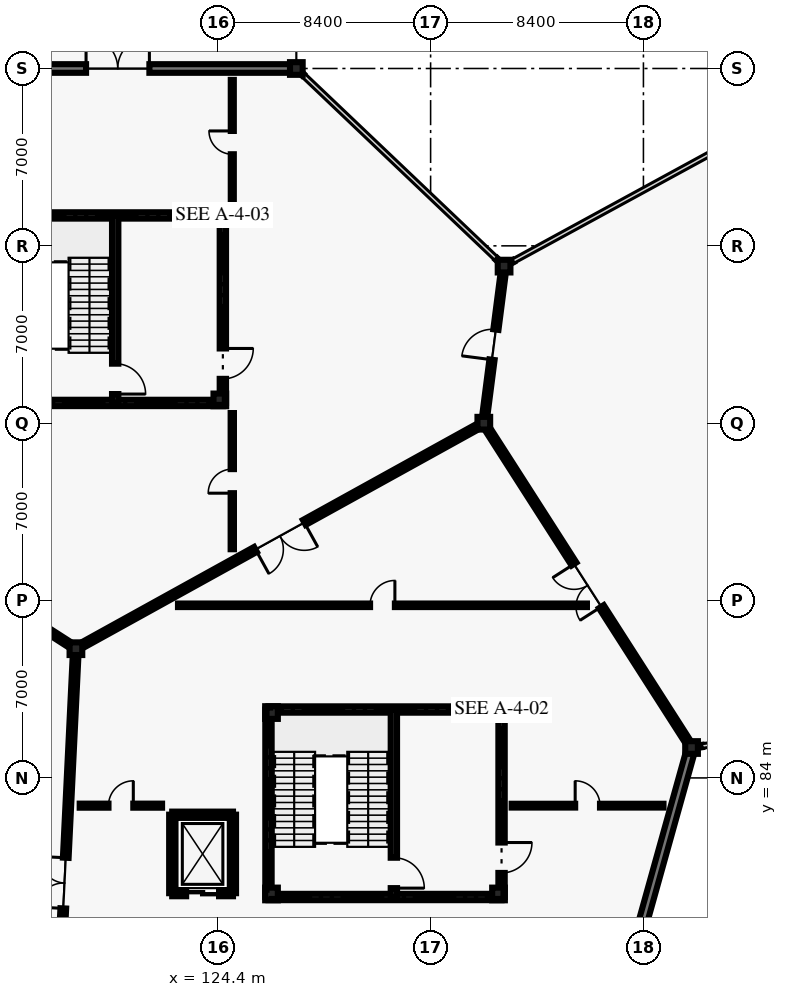
"""IFC4 building model, lengths in metres.
Left out: names, types, materials, properties, quantities, classifications, styles, units other than length and angle.
Written with IfcOpenShell. Run it as: python <this file> out.ifc"""

import sys

from ifc_helpers import new_model, si_unit, direction, frame, frame_2d, origin, origin_2d, place, context, subcontext, project, spatial, rectangle, i_section, extrude, element, fill, save


model = new_model("IFC4")
c1 = context("Model", 3, precision=1e-05, world=origin(), true_north=direction((0.0, 1.0)))
c2 = subcontext(c1, "Body", "Model", "MODEL_VIEW")
j1 = project(units=[si_unit("LENGTHUNIT", "METRE"), si_unit("PLANEANGLEUNIT", "RADIAN")], contexts=[c1])
p1 = place(None, origin())
s1 = spatial("IfcSite", under=j1, at=p1, CompositionType="ELEMENT")
p2 = place(p1, origin())
s2 = spatial("IfcBuilding", under=s1, at=p2, CompositionType="ELEMENT")
p3 = place(p2, origin())
s3 = spatial("IfcBuildingStorey", under=s2, at=p3, CompositionType="ELEMENT", Elevation=0.0)
for number, where, z_axis, x_axis in (
    (1, (118.8, 89.1, 0.0), (0.0, 0.0, 1.0), (1.0, 0.0, 0.0)),
    (2, (127.5, 112.0, 0.0), (0.0, 0.0, 1.0), (1.0, 0.0, 0.0)),
    (3, (134.9, 98.0, 0.0), (0.0, 0.0, 1.0), (1.0, 0.0, 0.0)),
    (4, (135.7, 104.2, 0.0), (0.0, 0.0, 1.0), (1.0, 0.0, 0.0)),
    (5, (143.1, 85.2, 0.0), (0.0, 0.0, 1.0), (1.0, 0.0, 0.0)),
    (6, (126.52, 79.42, 0.0), (0.0, 0.0, 1.0), (1.0, 0.0, 0.0)),
    (7, (135.48, 79.42, 0.0), (0.0, 0.0, 1.0), (1.0, 0.0, 0.0)),
    (8, (135.48, 86.58, 0.0), (0.0, 0.0, 1.0), (1.0, 0.0, 0.0)),
    (9, (126.52, 86.58, 0.0), (0.0, 0.0, 1.0), (1.0, 0.0, 0.0)),
    (10, (124.48, 98.92, 0.0), (0.0, 0.0, 1.0), (1.0, 0.0, 0.0)),
    (11, (124.48, 106.08, 0.0), (0.0, 0.0, 1.0), (1.0, 0.0, 0.0)),
):
    element("IfcColumn", number, at=place(p3, frame(where, z_axis=z_axis, x_axis=x_axis)), inside=s3, PredefinedType="COLUMN", context=c2, shape_type="SweptSolid", body=[
        extrude(i_section(OverallWidth=0.5, OverallDepth=0.5, WebThickness=0.022, FlangeThickness=0.036, at=origin_2d()), origin(), (0.0, 0.0, 1.0), 5.4),
    ])
p4 = place(p3, frame((143.084, 85.142, 0.0), z_axis=(0.0, 0.0, 1.0), x_axis=(-0.268810029922, -0.963193214165, 0.0)))
e12 = element("IfcWall", 12, at=p4, inside=s3, PredefinedType="SOLIDWALL", context=c2, shape_type="SweptSolid", body=[
    extrude(rectangle(XDim=13.333, YDim=0.34, at=frame_2d((6.667, 0.0))), origin(), (0.0, 0.0, 1.0), 4.22),
])
for number, where, z_axis, x_axis in (
    (13, (127.53, 111.971, 0.0), (0.0, 0.0, 1.0), (0.726, -0.687, 0.0)),
    (14, (135.403, 104.482, 0.0), (0.0, 0.0, 1.0), (0.726, -0.687, 0.0)),
):
    element("IfcWall", number, at=place(p3, frame(where, z_axis=z_axis, x_axis=x_axis)), inside=s3, PredefinedType="SOLIDWALL", context=c2, shape_type="SweptSolid", body=[
        extrude(rectangle(XDim=0.308, YDim=0.095, at=frame_2d((0.154, 0.0))), origin(), (0.0, 0.0, 1.0), 4.22),
    ])
p5 = place(p3, frame((113.4, 112.0, 0.0), z_axis=(0.0, 0.0, 1.0), x_axis=(1.0, 0.0, 0.0)))
e15 = element("IfcWall", 15, at=p5, inside=s3, PredefinedType="SOLIDWALL", context=c2, shape_type="SweptSolid", body=[
    extrude(rectangle(XDim=14.1, YDim=0.34, at=frame_2d((7.05, 0.0))), origin(), (0.0, 0.0, 1.0), 4.22),
])
p6 = place(p5, frame((5.8, 0.0, 0.0)))
e16 = element("IfcOpeningElement", 16, at=p6, cuts=e15, PredefinedType="OPENING", context=c2, shape_type="SweptSolid", body=[
    extrude(rectangle(XDim=2.5, YDim=2.45, at=frame_2d((1.25, 1.225))), frame((0.0, 0.18, 0.0), z_axis=(0.0, -1.0, 0.0), x_axis=(1.0, 0.0, 0.0)), (0.0, 0.0, 1.0), 0.36),
])
p7 = place(p3, frame((143.506, 85.257, 0.0), z_axis=(0.0, 0.0, 1.0), x_axis=(-0.990232667812, -0.139424759628, 0.0)))
e17 = element("IfcWall", 17, at=p7, inside=s3, PredefinedType="SOLIDWALL", context=c2, shape_type="SweptSolid", body=[
    extrude(rectangle(XDim=0.308, YDim=0.095, at=frame_2d((0.154, 0.0))), origin(), (0.0, 0.0, 1.0), 4.22),
])
p8 = place(p3, frame((135.79, 104.249, 0.0), z_axis=(0.0, 0.0, 1.0), x_axis=(0.876984894636, 0.480517944077, 0.0)))
e18 = element("IfcWall", 18, at=p8, inside=s3, PredefinedType="SOLIDWALL", context=c2, shape_type="SweptSolid", body=[
    extrude(rectangle(XDim=0.308, YDim=0.095, at=frame_2d((0.154, 0.0))), origin(), (0.0, 0.0, 1.0), 4.22),
])
p9 = place(p3, frame((117.9, 70.6, 0.0), z_axis=(0.0, 0.0, 1.0), x_axis=(0.048599072515, 0.998818366947, 0.0)))
e19 = element("IfcWall", 19, at=p9, inside=s3, PredefinedType="SOLIDWALL", context=c2, shape_type="SweptSolid", body=[
    extrude(rectangle(XDim=18.522, YDim=0.225, at=frame_2d((9.261, 0.0))), origin(), (0.0, 0.0, 1.0), 4.62),
])
p10 = place(p9, frame((8.261, 0.0, 0.0)))
e20 = element("IfcOpeningElement", 20, at=p10, cuts=e19, PredefinedType="OPENING", context=c2, shape_type="SweptSolid", body=[
    extrude(rectangle(XDim=2.0, YDim=2.5, at=frame_2d((1.0, 1.25))), frame((0.0, 0.123, 0.0), z_axis=(0.0, -1.0, 0.0), x_axis=(1.0, 0.0, 0.0)), (0.0, 0.0, 1.0), 0.245),
])
p11 = place(p3, frame((118.8, 89.1, 0.0), z_axis=(0.0, 0.0, 1.0), x_axis=(-0.841183241423, 0.540750177392, 0.0)))
e21 = element("IfcWall", 21, at=p11, inside=s3, PredefinedType="SOLIDWALL", context=c2, shape_type="SweptSolid", body=[
    extrude(rectangle(XDim=18.308, YDim=0.225, at=frame_2d((9.154, 0.0))), origin(), (0.0, 0.0, 1.0), 4.62),
])
p12 = place(p11, frame((8.229, 0.0, 0.0)))
e22 = element("IfcOpeningElement", 22, at=p12, cuts=e21, PredefinedType="OPENING", context=c2, shape_type="SweptSolid", body=[
    extrude(rectangle(XDim=1.85, YDim=2.4, at=frame_2d((0.925, 1.2))), frame((0.0, 0.123, 0.0), z_axis=(0.0, -1.0, 0.0), x_axis=(1.0, 0.0, 0.0)), (0.0, 0.0, 1.0), 0.245),
])
p13 = place(p3, frame((134.9, 98.0, 0.0), z_axis=(0.0, 0.0, 1.0), x_axis=(-0.875181353329, -0.483794996652, 0.0)))
e23 = element("IfcWall", 23, at=p13, inside=s3, PredefinedType="SOLIDWALL", context=c2, shape_type="SweptSolid", body=[
    extrude(rectangle(XDim=18.396, YDim=0.225, at=frame_2d((9.198, 0.0))), origin(), (0.0, 0.0, 1.0), 4.62),
])
p14 = place(p13, frame((8.098, 0.0, 0.0)))
e24 = element("IfcOpeningElement", 24, at=p14, cuts=e23, PredefinedType="OPENING", context=c2, shape_type="SweptSolid", body=[
    extrude(rectangle(XDim=2.2, YDim=2.6, at=frame_2d((1.1, 1.3))), frame((0.0, 0.123, 0.0), z_axis=(0.0, -1.0, 0.0), x_axis=(1.0, 0.0, 0.0)), (0.0, 0.0, 1.0), 0.245),
])
p15 = place(p3, frame((143.1, 85.2, 0.0), z_axis=(0.0, 0.0, 1.0), x_axis=(-0.539434641352, 0.842027474439, 0.0)))
e25 = element("IfcWall", 25, at=p15, inside=s3, PredefinedType="SOLIDWALL", context=c2, shape_type="SweptSolid", body=[
    extrude(rectangle(XDim=15.201, YDim=0.225, at=frame_2d((7.601, 0.0))), origin(), (0.0, 0.0, 1.0), 4.62),
])
p16 = place(p15, frame((6.601, 0.0, 0.0)))
e26 = element("IfcOpeningElement", 26, at=p16, cuts=e25, PredefinedType="OPENING", context=c2, shape_type="SweptSolid", body=[
    extrude(rectangle(XDim=2.0, YDim=2.5, at=frame_2d((1.0, 1.25))), frame((0.0, 0.123, 0.0), z_axis=(0.0, -1.0, 0.0), x_axis=(1.0, 0.0, 0.0)), (0.0, 0.0, 1.0), 0.245),
])
p17 = place(p3, frame((134.9, 98.0, 0.0), z_axis=(0.0, 0.0, 1.0), x_axis=(0.127980011854, 0.991776747341, 0.0)))
e27 = element("IfcWall", 27, at=p17, inside=s3, PredefinedType="SOLIDWALL", context=c2, shape_type="SweptSolid", body=[
    extrude(rectangle(XDim=6.251, YDim=0.205, at=frame_2d((3.126, 0.0))), origin(), (0.0, 0.0, 1.0), 3.92),
])
p18 = place(p17, frame((2.526, 0.0, 0.0)))
e28 = element("IfcOpeningElement", 28, at=p18, cuts=e27, PredefinedType="OPENING", context=c2, shape_type="SweptSolid", body=[
    extrude(rectangle(XDim=1.2, YDim=2.2, at=frame_2d((0.6, 1.1))), frame((0.0, 0.113, 0.0), z_axis=(0.0, -1.0, 0.0), x_axis=(1.0, 0.0, 0.0)), (0.0, 0.0, 1.0), 0.225),
])
p19 = place(p3, frame((118.949, 82.905, 0.0), z_axis=(0.0, 0.0, 1.0), x_axis=(1.0, 0.0, 0.0)))
e29 = element("IfcWall", 29, at=p19, inside=s3, PredefinedType="PARTITIONING", context=c2, shape_type="SweptSolid", body=[
    extrude(rectangle(XDim=3.251, YDim=0.16, at=frame_2d((1.625, 0.0))), origin(), (0.0, 0.0, 1.0), 3.92),
])
p20 = place(p19, frame((1.136, 0.0, 0.0)))
e30 = element("IfcOpeningElement", 30, at=p20, cuts=e29, PredefinedType="OPENING", context=c2, shape_type="SweptSolid", body=[
    extrude(rectangle(XDim=0.98, YDim=2.15, at=frame_2d((0.49, 1.075))), frame((0.0, 0.09, 0.0), z_axis=(0.0, -1.0, 0.0), x_axis=(1.0, 0.0, 0.0)), (0.0, 0.0, 1.0), 0.18),
])
p21 = place(p3, frame((136.0, 82.905, 0.0), z_axis=(0.0, 0.0, 1.0), x_axis=(1.0, 0.0, 0.0)))
e31 = element("IfcWall", 31, at=p21, inside=s3, PredefinedType="PARTITIONING", context=c2, shape_type="SweptSolid", body=[
    extrude(rectangle(XDim=5.992, YDim=0.15, at=frame_2d((2.996, 0.0))), origin(), (0.0, 0.0, 1.0), 3.92),
])
p22 = place(p21, frame((2.506, 0.0, 0.0)))
e32 = element("IfcOpeningElement", 32, at=p22, cuts=e31, PredefinedType="OPENING", context=c2, shape_type="SweptSolid", body=[
    extrude(rectangle(XDim=0.98, YDim=2.15, at=frame_2d((0.49, 1.075))), frame((0.0, 0.085, 0.0), z_axis=(0.0, -1.0, 0.0), x_axis=(1.0, 0.0, 0.0)), (0.0, 0.0, 1.0), 0.17),
])
p23 = place(p3, frame((122.829, 90.813, 0.0), z_axis=(0.0, 0.0, 1.0), x_axis=(1.0, 0.0, 0.0)))
e33 = element("IfcWall", 33, at=p23, inside=s3, PredefinedType="PARTITIONING", context=c2, shape_type="SweptSolid", body=[
    extrude(rectangle(XDim=16.141, YDim=0.14, at=frame_2d((8.07, 0.0))), origin(), (0.0, 0.0, 1.0), 3.92),
])
p24 = place(p23, frame((7.581, 0.0, 0.0)))
e34 = element("IfcOpeningElement", 34, at=p24, cuts=e33, PredefinedType="OPENING", context=c2, shape_type="SweptSolid", body=[
    extrude(rectangle(XDim=0.98, YDim=2.15, at=frame_2d((0.49, 1.075))), frame((0.0, 0.08, 0.0), z_axis=(0.0, -1.0, 0.0), x_axis=(1.0, 0.0, 0.0)), (0.0, 0.0, 1.0), 0.16),
])
p25 = place(p3, frame((124.972, 93.026, 0.0), z_axis=(0.0, 0.0, 1.0), x_axis=(0.0, 1.0, 0.0)))
e35 = element("IfcWall", 35, at=p25, inside=s3, PredefinedType="PARTITIONING", context=c2, shape_type="SweptSolid", body=[
    extrude(rectangle(XDim=5.374, YDim=0.13, at=frame_2d((2.687, 0.0))), origin(), (0.0, 0.0, 1.0), 3.92),
])
p26 = place(p25, frame((2.212, 0.0, 0.0)))
e36 = element("IfcOpeningElement", 36, at=p26, cuts=e35, PredefinedType="OPENING", context=c2, shape_type="SweptSolid", body=[
    extrude(rectangle(XDim=0.95, YDim=2.15, at=frame_2d((0.475, 1.075))), frame((0.0, 0.075, 0.0), z_axis=(0.0, -1.0, 0.0), x_axis=(1.0, 0.0, 0.0)), (0.0, 0.0, 1.0), 0.15),
])
p27 = place(p3, frame((124.972, 106.6, 0.0), z_axis=(0.0, 0.0, 1.0), x_axis=(0.0, 1.0, 0.0)))
e37 = element("IfcWall", 37, at=p27, inside=s3, PredefinedType="PARTITIONING", context=c2, shape_type="SweptSolid", body=[
    extrude(rectangle(XDim=4.95, YDim=0.12, at=frame_2d((2.475, 0.0))), origin(), (0.0, 0.0, 1.0), 3.92),
])
p28 = place(p27, frame((2.015, 0.0, 0.0)))
e38 = element("IfcOpeningElement", 38, at=p28, cuts=e37, PredefinedType="OPENING", context=c2, shape_type="SweptSolid", body=[
    extrude(rectangle(XDim=0.92, YDim=2.1, at=frame_2d((0.46, 1.05))), frame((0.0, 0.07, 0.0), z_axis=(0.0, -1.0, 0.0), x_axis=(1.0, 0.0, 0.0)), (0.0, 0.0, 1.0), 0.14),
])
p29 = place(p3, frame((126.4, 79.3, 0.0), z_axis=(0.0, 0.0, 1.0), x_axis=(0.0, 1.0, 0.0)))
e39 = element("IfcWall", 39, at=p29, inside=s3, PredefinedType="SHEAR", context=c2, shape_type="SweptSolid", body=[
    extrude(rectangle(XDim=7.4, YDim=0.25, at=frame_2d((3.7, 0.0))), origin(), (0.0, 0.0, 1.0), 5.16),
])
for number, where, z_axis, x_axis in (
    (40, (126.4, 86.7, 0.0), (0.0, 0.0, 1.0), (1.0, 0.0, 0.0)),
    (41, (135.6, 79.3, 0.0), (0.0, 0.0, 1.0), (-1.0, 0.0, 0.0)),
):
    element("IfcWall", number, at=place(p3, frame(where, z_axis=z_axis, x_axis=x_axis)), inside=s3, PredefinedType="SHEAR", context=c2, shape_type="SweptSolid", body=[
        extrude(rectangle(XDim=9.2, YDim=0.25, at=frame_2d((4.6, 0.0))), origin(), (0.0, 0.0, 1.0), 5.16),
    ])
p30 = place(p3, frame((135.6, 86.7, 0.0), z_axis=(0.0, 0.0, 1.0), x_axis=(0.0, -1.0, 0.0)))
e42 = element("IfcWall", 42, at=p30, inside=s3, PredefinedType="SHEAR", context=c2, shape_type="SweptSolid", body=[
    extrude(rectangle(XDim=7.4, YDim=0.25, at=frame_2d((3.7, 0.0))), origin(), (0.0, 0.0, 1.0), 5.16),
])
p31 = place(p30, frame((5.25, 0.0, 0.0)))
e43 = element("IfcOpeningElement", 43, at=p31, cuts=e42, PredefinedType="OPENING", context=c2, shape_type="SweptSolid", body=[
    extrude(rectangle(XDim=1.2, YDim=2.2, at=frame_2d((0.6, 1.1))), frame((0.0, 0.135, 0.0), z_axis=(0.0, -1.0, 0.0), x_axis=(1.0, 0.0, 0.0)), (0.0, 0.0, 1.0), 0.27),
])
p32 = place(p3, frame((131.35, 86.7, 0.0), z_axis=(0.0, 0.0, 1.0), x_axis=(0.0, -1.0, 0.0)))
e44 = element("IfcWall", 44, at=p32, inside=s3, PredefinedType="SHEAR", context=c2, shape_type="SweptSolid", body=[
    extrude(rectangle(XDim=7.4, YDim=0.25, at=frame_2d((3.7, 0.0))), origin(), (0.0, 0.0, 1.0), 5.16),
])
p33 = place(p32, frame((5.85, 0.0, 0.0)))
e45 = element("IfcOpeningElement", 45, at=p33, cuts=e44, PredefinedType="OPENING", context=c2, shape_type="SweptSolid", body=[
    extrude(rectangle(XDim=1.2, YDim=2.2, at=frame_2d((0.6, 1.1))), frame((0.0, 0.135, 0.0), z_axis=(0.0, -1.0, 0.0), x_axis=(1.0, 0.0, 0.0)), (0.0, 0.0, 1.0), 0.27),
])
for number, where, z_axis, x_axis in (
    (46, (115.4, 106.2, 0.0), (0.0, 0.0, 1.0), (1.0, 0.0, 0.0)),
    (47, (124.6, 98.8, 0.0), (0.0, 0.0, 1.0), (-1.0, 0.0, 0.0)),
):
    element("IfcWall", number, at=place(p3, frame(where, z_axis=z_axis, x_axis=x_axis)), inside=s3, PredefinedType="SHEAR", context=c2, shape_type="SweptSolid", body=[
        extrude(rectangle(XDim=9.2, YDim=0.25, at=frame_2d((4.6, 0.0))), origin(), (0.0, 0.0, 1.0), 5.16),
    ])
p34 = place(p3, frame((124.6, 106.2, 0.0), z_axis=(0.0, 0.0, 1.0), x_axis=(0.0, -1.0, 0.0)))
e48 = element("IfcWall", 48, at=p34, inside=s3, PredefinedType="SHEAR", context=c2, shape_type="SweptSolid", body=[
    extrude(rectangle(XDim=7.4, YDim=0.25, at=frame_2d((3.7, 0.0))), origin(), (0.0, 0.0, 1.0), 5.16),
])
p35 = place(p34, frame((5.25, 0.0, 0.0)))
e49 = element("IfcOpeningElement", 49, at=p35, cuts=e48, PredefinedType="OPENING", context=c2, shape_type="SweptSolid", body=[
    extrude(rectangle(XDim=1.2, YDim=2.2, at=frame_2d((0.6, 1.1))), frame((0.0, 0.135, 0.0), z_axis=(0.0, -1.0, 0.0), x_axis=(1.0, 0.0, 0.0)), (0.0, 0.0, 1.0), 0.27),
])
p36 = place(p3, frame((120.35, 106.2, 0.0), z_axis=(0.0, 0.0, 1.0), x_axis=(0.0, -1.0, 0.0)))
e50 = element("IfcWall", 50, at=p36, inside=s3, PredefinedType="SHEAR", context=c2, shape_type="SweptSolid", body=[
    extrude(rectangle(XDim=7.4, YDim=0.25, at=frame_2d((3.7, 0.0))), origin(), (0.0, 0.0, 1.0), 5.16),
])
p37 = place(p36, frame((5.85, 0.0, 0.0)))
e51 = element("IfcOpeningElement", 51, at=p37, cuts=e50, PredefinedType="OPENING", context=c2, shape_type="SweptSolid", body=[
    extrude(rectangle(XDim=1.2, YDim=2.2, at=frame_2d((0.6, 1.1))), frame((0.0, 0.135, 0.0), z_axis=(0.0, -1.0, 0.0), x_axis=(1.0, 0.0, 0.0)), (0.0, 0.0, 1.0), 0.27),
])
p38 = place(p3, frame((122.6, 82.55, 0.0), z_axis=(0.0, 0.0, 1.0), x_axis=(1.0, 0.0, 0.0)))
e52 = element("IfcWall", 52, at=p38, inside=s3, PredefinedType="SHEAR", context=c2, shape_type="SweptSolid", body=[
    extrude(rectangle(XDim=2.4, YDim=0.24, at=frame_2d((1.2, 0.0))), origin(), (0.0, 0.0, 1.0), 5.16),
])
for number, where, z_axis, x_axis in (
    (53, (125.0, 82.55, 0.0), (0.0, 0.0, 1.0), (0.0, -1.0, 0.0)),
    (54, (122.6, 79.45, 0.0), (0.0, 0.0, 1.0), (0.0, 1.0, 0.0)),
):
    element("IfcWall", number, at=place(p3, frame(where, z_axis=z_axis, x_axis=x_axis)), inside=s3, PredefinedType="SHEAR", context=c2, shape_type="SweptSolid", body=[
        extrude(rectangle(XDim=3.1, YDim=0.24, at=frame_2d((1.55, 0.0))), origin(), (0.0, 0.0, 1.0), 5.16),
    ])
p39 = place(p3, frame((125.0, 79.45, 0.0), z_axis=(0.0, 0.0, 1.0), x_axis=(-1.0, 0.0, 0.0)))
e55 = element("IfcWall", 55, at=p39, inside=s3, PredefinedType="SHEAR", context=c2, shape_type="SweptSolid", body=[
    extrude(rectangle(XDim=2.4, YDim=0.24, at=frame_2d((1.2, 0.0))), origin(), (0.0, 0.0, 1.0), 5.16),
])
p40 = place(p39, frame((0.55, 0.0, 0.0)))
e56 = element("IfcOpeningElement", 56, at=p40, cuts=e55, PredefinedType="OPENING", context=c2, shape_type="SweptSolid", body=[
    extrude(rectangle(XDim=1.3, YDim=2.25, at=frame_2d((0.65, 1.125))), frame((0.0, 0.13, 0.0), z_axis=(0.0, -1.0, 0.0), x_axis=(1.0, 0.0, 0.0)), (0.0, 0.0, 1.0), 0.26),
])
p41 = place(p6, origin())
e57 = element("IfcDoor", 57, at=p41, inside=s3, OperationType="DOUBLE_DOOR_SINGLE_SWING", PredefinedType="DOOR", context=c2, shape_type="SweptSolid", body=[
    extrude(rectangle(XDim=2.5, YDim=2.45, at=frame_2d((1.25, 1.225))), frame((0.0, 0.025, 0.0), z_axis=(0.0, -1.0, 0.0), x_axis=(1.0, 0.0, 0.0)), (0.0, 0.0, 1.0), 0.05),
])
fill(e16, e57)
p42 = place(p10, origin())
e58 = element("IfcDoor", 58, at=p42, inside=s3, OperationType="DOUBLE_DOOR_SINGLE_SWING", PredefinedType="DOOR", context=c2, shape_type="SweptSolid", body=[
    extrude(rectangle(XDim=2.0, YDim=2.5, at=frame_2d((1.0, 1.25))), frame((0.0, 0.025, 0.0), z_axis=(0.0, -1.0, 0.0), x_axis=(1.0, 0.0, 0.0)), (0.0, 0.0, 1.0), 0.05),
])
fill(e20, e58)
p43 = place(p14, origin())
e59 = element("IfcDoor", 59, at=p43, inside=s3, OperationType="DOUBLE_DOOR_SINGLE_SWING", PredefinedType="DOOR", context=c2, shape_type="SweptSolid", body=[
    extrude(rectangle(XDim=2.2, YDim=2.6, at=frame_2d((1.1, 1.3))), frame((0.0, 0.025, 0.0), z_axis=(0.0, -1.0, 0.0), x_axis=(1.0, 0.0, 0.0)), (0.0, 0.0, 1.0), 0.05),
])
fill(e24, e59)
p44 = place(p16, origin())
e60 = element("IfcDoor", 60, at=p44, inside=s3, OperationType="DOUBLE_DOOR_SINGLE_SWING", PredefinedType="DOOR", context=c2, shape_type="SweptSolid", body=[
    extrude(rectangle(XDim=2.0, YDim=2.5, at=frame_2d((1.0, 1.25))), frame((0.0, 0.025, 0.0), z_axis=(0.0, -1.0, 0.0), x_axis=(1.0, 0.0, 0.0)), (0.0, 0.0, 1.0), 0.05),
])
fill(e26, e60)
p45 = place(p18, origin())
e61 = element("IfcDoor", 61, at=p45, inside=s3, OperationType="SINGLE_SWING_LEFT", PredefinedType="DOOR", context=c2, shape_type="SweptSolid", body=[
    extrude(rectangle(XDim=1.2, YDim=2.2, at=frame_2d((0.6, 1.1))), frame((0.0, 0.025, 0.0), z_axis=(0.0, -1.0, 0.0), x_axis=(1.0, 0.0, 0.0)), (0.0, 0.0, 1.0), 0.05),
])
fill(e28, e61)
p46 = place(p20, origin())
e62 = element("IfcDoor", 62, at=p46, inside=s3, OperationType="SINGLE_SWING_RIGHT", PredefinedType="DOOR", context=c2, shape_type="SweptSolid", body=[
    extrude(rectangle(XDim=0.98, YDim=2.15, at=frame_2d((0.49, 1.075))), frame((0.0, 0.025, 0.0), z_axis=(0.0, -1.0, 0.0), x_axis=(1.0, 0.0, 0.0)), (0.0, 0.0, 1.0), 0.05),
])
fill(e30, e62)
p47 = place(p22, origin())
e63 = element("IfcDoor", 63, at=p47, inside=s3, OperationType="SINGLE_SWING_LEFT", PredefinedType="DOOR", context=c2, shape_type="SweptSolid", body=[
    extrude(rectangle(XDim=0.98, YDim=2.15, at=frame_2d((0.49, 1.075))), frame((0.0, 0.025, 0.0), z_axis=(0.0, -1.0, 0.0), x_axis=(1.0, 0.0, 0.0)), (0.0, 0.0, 1.0), 0.05),
])
fill(e32, e63)
p48 = place(p24, origin())
e64 = element("IfcDoor", 64, at=p48, inside=s3, OperationType="SINGLE_SWING_RIGHT", PredefinedType="DOOR", context=c2, shape_type="SweptSolid", body=[
    extrude(rectangle(XDim=0.98, YDim=2.15, at=frame_2d((0.49, 1.075))), frame((0.0, 0.025, 0.0), z_axis=(0.0, -1.0, 0.0), x_axis=(1.0, 0.0, 0.0)), (0.0, 0.0, 1.0), 0.05),
])
fill(e34, e64)
p49 = place(p26, origin())
e65 = element("IfcDoor", 65, at=p49, inside=s3, OperationType="SINGLE_SWING_LEFT", PredefinedType="DOOR", context=c2, shape_type="SweptSolid", body=[
    extrude(rectangle(XDim=0.95, YDim=2.15, at=frame_2d((0.475, 1.075))), frame((0.0, 0.025, 0.0), z_axis=(0.0, -1.0, 0.0), x_axis=(1.0, 0.0, 0.0)), (0.0, 0.0, 1.0), 0.05),
])
fill(e36, e65)
p50 = place(p28, origin())
e66 = element("IfcDoor", 66, at=p50, inside=s3, OperationType="SINGLE_SWING_RIGHT", PredefinedType="DOOR", context=c2, shape_type="SweptSolid", body=[
    extrude(rectangle(XDim=0.92, YDim=2.1, at=frame_2d((0.46, 1.05))), frame((0.0, 0.025, 0.0), z_axis=(0.0, -1.0, 0.0), x_axis=(1.0, 0.0, 0.0)), (0.0, 0.0, 1.0), 0.05),
])
fill(e38, e66)
p51 = place(p31, origin())
e67 = element("IfcDoor", 67, at=p51, inside=s3, OperationType="SINGLE_SWING_LEFT", PredefinedType="DOOR", context=c2, shape_type="SweptSolid", body=[
    extrude(rectangle(XDim=1.2, YDim=2.2, at=frame_2d((0.6, 1.1))), frame((0.0, 0.025, 0.0), z_axis=(0.0, -1.0, 0.0), x_axis=(1.0, 0.0, 0.0)), (0.0, 0.0, 1.0), 0.05),
])
fill(e43, e67)
p52 = place(p33, origin())
e68 = element("IfcDoor", 68, at=p52, inside=s3, OperationType="SINGLE_SWING_RIGHT", PredefinedType="DOOR", context=c2, shape_type="SweptSolid", body=[
    extrude(rectangle(XDim=1.2, YDim=2.2, at=frame_2d((0.6, 1.1))), frame((0.0, 0.025, 0.0), z_axis=(0.0, -1.0, 0.0), x_axis=(1.0, 0.0, 0.0)), (0.0, 0.0, 1.0), 0.05),
])
fill(e45, e68)
p53 = place(p35, origin())
e69 = element("IfcDoor", 69, at=p53, inside=s3, OperationType="SINGLE_SWING_LEFT", PredefinedType="DOOR", context=c2, shape_type="SweptSolid", body=[
    extrude(rectangle(XDim=1.2, YDim=2.2, at=frame_2d((0.6, 1.1))), frame((0.0, 0.025, 0.0), z_axis=(0.0, -1.0, 0.0), x_axis=(1.0, 0.0, 0.0)), (0.0, 0.0, 1.0), 0.05),
])
fill(e49, e69)
p54 = place(p37, origin())
e70 = element("IfcDoor", 70, at=p54, inside=s3, OperationType="SINGLE_SWING_RIGHT", PredefinedType="DOOR", context=c2, shape_type="SweptSolid", body=[
    extrude(rectangle(XDim=1.2, YDim=2.2, at=frame_2d((0.6, 1.1))), frame((0.0, 0.025, 0.0), z_axis=(0.0, -1.0, 0.0), x_axis=(1.0, 0.0, 0.0)), (0.0, 0.0, 1.0), 0.05),
])
fill(e51, e70)
p55 = place(p40, origin())
e71 = element("IfcDoor", 71, at=p55, inside=s3, OperationType="SLIDING_TO_LEFT", PredefinedType="DOOR", context=c2, shape_type="SweptSolid", body=[
    extrude(rectangle(XDim=1.3, YDim=2.25, at=frame_2d((0.65, 1.125))), frame((0.0, 0.025, 0.0), z_axis=(0.0, -1.0, 0.0), x_axis=(1.0, 0.0, 0.0)), (0.0, 0.0, 1.0), 0.05),
])
fill(e56, e71)
save(model, sys.argv[1])
